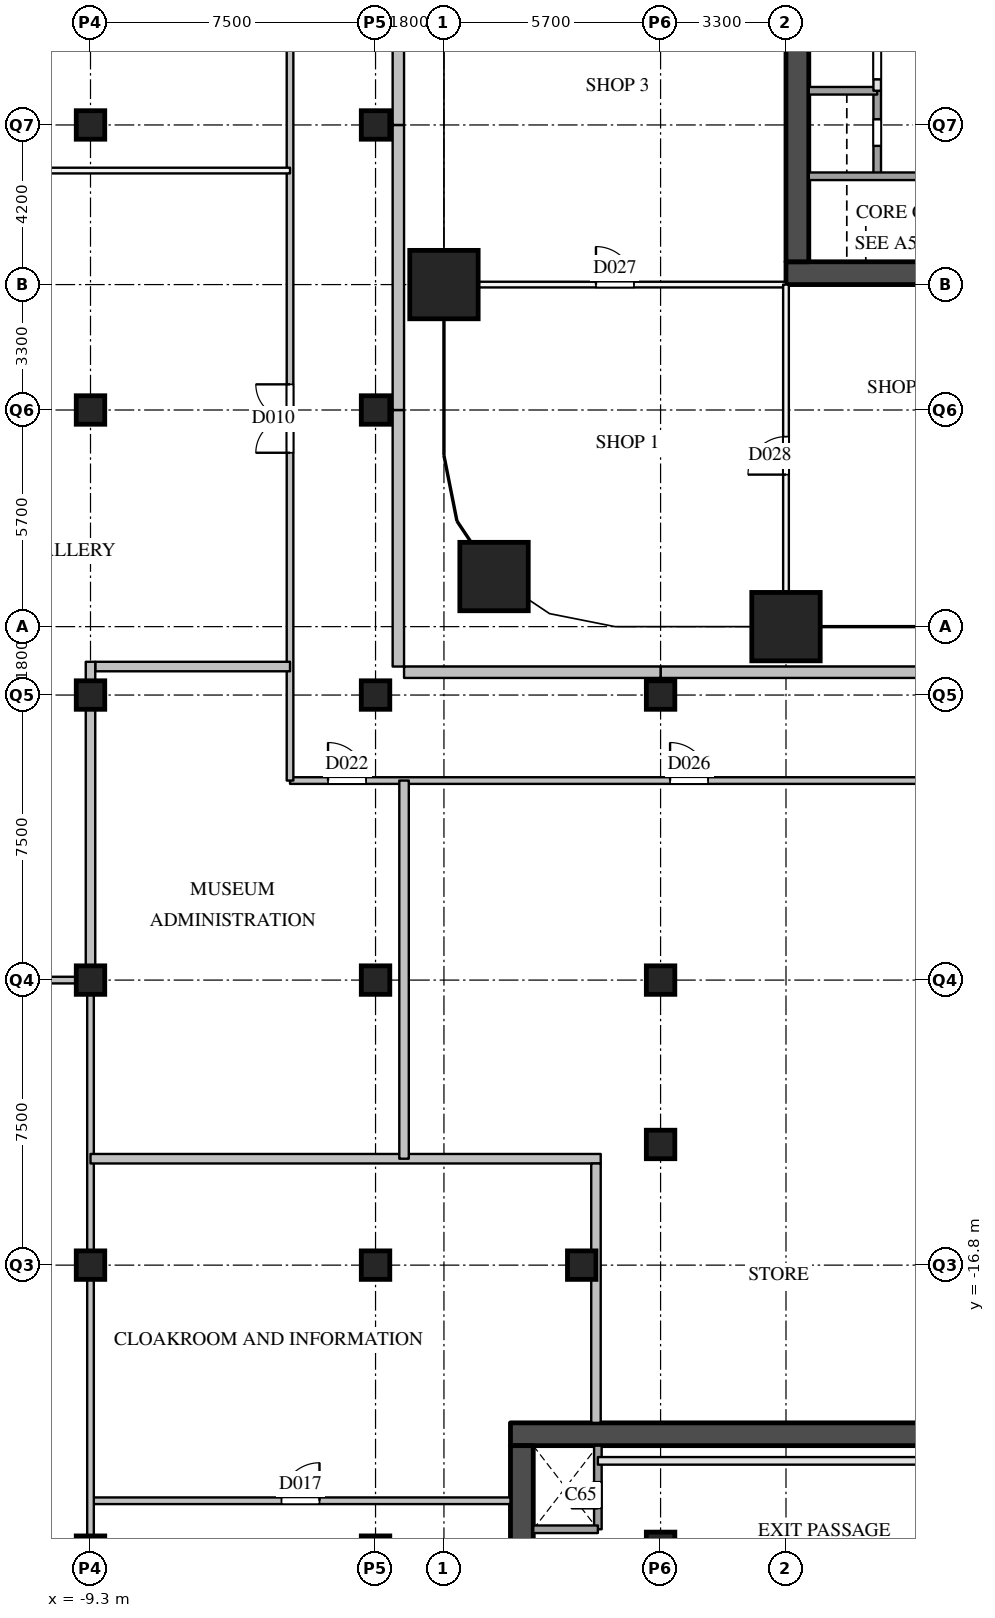
"""IFC4 building model, lengths in metres.
Left out: names, types, materials, properties, quantities, classifications, styles, units other than length and angle.
Written with IfcOpenShell. Run it as: python <this file> out.ifc"""

import sys

from ifc_helpers import new_model, si_unit, direction, frame, frame_2d, origin, origin_2d, place, context, subcontext, project, spatial, rectangle, extrude, element, fill, save


model = new_model("IFC4")
c1 = context("Model", 3, precision=1e-05, world=origin(), true_north=direction((0.0, 1.0)))
c2 = subcontext(c1, "Body", "Model", "MODEL_VIEW")
j1 = project(units=[si_unit("LENGTHUNIT", "METRE"), si_unit("PLANEANGLEUNIT", "RADIAN")], contexts=[c1])
p1 = place(None, origin())
s1 = spatial("IfcSite", under=j1, at=p1, CompositionType="ELEMENT")
p2 = place(p1, origin())
s2 = spatial("IfcBuilding", under=s1, at=p2, CompositionType="ELEMENT")
p3 = place(p2, origin())
s3 = spatial("IfcBuildingStorey", under=s2, at=p3, CompositionType="ELEMENT", Elevation=0.0)
for number, where, z_axis, x_axis in (
    (1, (1.318, 1.318, 0.0), (0.0, 0.0, 1.0), (1.0, 0.0, 0.0)),
    (2, (0.0, 9.0, 0.0), (0.0, 0.0, 1.0), (1.0, 0.0, 0.0)),
    (3, (9.0, 0.0, 0.0), (0.0, 0.0, 1.0), (1.0, 0.0, 0.0)),
):
    element("IfcColumn", number, at=place(p3, frame(where, z_axis=z_axis, x_axis=x_axis)), inside=s3, PredefinedType="COLUMN", context=c2, shape_type="SweptSolid", body=[
        extrude(rectangle(XDim=1.8, YDim=1.8, at=origin_2d()), origin(), (0.0, 0.0, 1.0), 8.0),
    ])
for number, where, z_axis, x_axis in (
    (4, (-9.3, -24.3, 0.0), (0.0, 0.0, 1.0), (1.0, 0.0, 0.0)),
    (5, (-9.3, -16.8, 0.0), (0.0, 0.0, 1.0), (1.0, 0.0, 0.0)),
    (6, (-9.3, -9.3, 0.0), (0.0, 0.0, 1.0), (1.0, 0.0, 0.0)),
    (7, (-9.3, -1.8, 0.0), (0.0, 0.0, 1.0), (1.0, 0.0, 0.0)),
    (8, (-9.3, 5.7, 0.0), (0.0, 0.0, 1.0), (1.0, 0.0, 0.0)),
    (9, (-9.3, 13.2, 0.0), (0.0, 0.0, 1.0), (1.0, 0.0, 0.0)),
    (10, (-1.8, -24.3, 0.0), (0.0, 0.0, 1.0), (1.0, 0.0, 0.0)),
    (11, (-1.8, -16.8, 0.0), (0.0, 0.0, 1.0), (1.0, 0.0, 0.0)),
    (12, (-1.8, -9.3, 0.0), (0.0, 0.0, 1.0), (1.0, 0.0, 0.0)),
    (13, (-1.8, -1.8, 0.0), (0.0, 0.0, 1.0), (1.0, 0.0, 0.0)),
    (14, (-1.8, 5.7, 0.0), (0.0, 0.0, 1.0), (1.0, 0.0, 0.0)),
    (15, (-1.8, 13.2, 0.0), (0.0, 0.0, 1.0), (1.0, 0.0, 0.0)),
    (16, (5.7, -24.2, 0.0), (0.0, 0.0, 1.0), (1.0, 0.0, 0.0)),
    (17, (5.7, -9.3, 0.0), (0.0, 0.0, 1.0), (1.0, 0.0, 0.0)),
    (18, (5.7, -1.8, 0.0), (0.0, 0.0, 1.0), (1.0, 0.0, 0.0)),
    (19, (3.625, -16.8, 0.0), (0.0, 0.0, 1.0), (1.0, 0.0, 0.0)),
    (20, (5.7, -13.625, 0.0), (0.0, 0.0, 1.0), (1.0, 0.0, 0.0)),
):
    element("IfcColumn", number, at=place(p3, frame(where, z_axis=z_axis, x_axis=x_axis)), inside=s3, PredefinedType="COLUMN", context=c2, shape_type="SweptSolid", body=[
        extrude(rectangle(XDim=0.75, YDim=0.75, at=origin_2d()), origin(), (0.0, 0.0, 1.0), 8.0),
    ])
p4 = place(p3, frame((13.2, -1.2, 0.0), z_axis=(0.0, 0.0, 1.0), x_axis=(-1.0, 0.0, 0.0)))
e21 = element("IfcWall", 21, at=p4, inside=s3, PredefinedType="SOLIDWALL", context=c2, shape_type="SweptSolid", body=[
    extrude(rectangle(XDim=7.5, YDim=0.3, at=frame_2d((3.75, 0.0))), origin(), (0.0, 0.0, 1.0), 7.59),
])
for number, where, z_axis, x_axis in (
    (22, (5.7, -1.2, 0.0), (0.0, 0.0, 1.0), (-1.0, 0.0, 0.0)),
    (23, (-1.2, -1.05, 0.0), (0.0, 0.0, 1.0), (0.0, 1.0, 0.0)),
):
    element("IfcWall", number, at=place(p3, frame(where, z_axis=z_axis, x_axis=x_axis)), inside=s3, PredefinedType="SOLIDWALL", context=c2, shape_type="SweptSolid", body=[
        extrude(rectangle(XDim=6.75, YDim=0.3, at=frame_2d((3.375, 0.0))), origin(), (0.0, 0.0, 1.0), 7.59),
    ])
for number, where, z_axis, x_axis in (
    (24, (-1.2, 5.7, 0.0), (0.0, 0.0, 1.0), (0.0, 1.0, 0.0)),
    (25, (-1.2, 13.2, 0.0), (0.0, 0.0, 1.0), (0.0, 1.0, 0.0)),
):
    element("IfcWall", number, at=place(p3, frame(where, z_axis=z_axis, x_axis=x_axis)), inside=s3, PredefinedType="SOLIDWALL", context=c2, shape_type="SweptSolid", body=[
        extrude(rectangle(XDim=7.5, YDim=0.3, at=frame_2d((3.75, 0.0))), origin(), (0.0, 0.0, 1.0), 7.59),
    ])
p5 = place(p3, frame((9.0, 9.3, 0.0), z_axis=(0.0, 0.0, 1.0), x_axis=(1.0, 0.0, 0.0)))
e26 = element("IfcWall", 26, at=p5, inside=s3, PredefinedType="SHEAR", context=c2, shape_type="SweptSolid", body=[
    extrude(rectangle(XDim=9.0, YDim=0.6, at=frame_2d((4.5, 0.0))), origin(), (0.0, 0.0, 1.0), 7.59),
])
p6 = place(p3, frame((9.3, 9.6, 0.0), z_axis=(0.0, 0.0, 1.0), x_axis=(0.0, 1.0, 0.0)))
e27 = element("IfcWall", 27, at=p6, inside=s3, PredefinedType="SHEAR", context=c2, shape_type="SweptSolid", body=[
    extrude(rectangle(XDim=12.3, YDim=0.6, at=frame_2d((6.15, 0.0))), origin(), (0.0, 0.0, 1.0), 7.59),
])
p7 = place(p3, frame((11.4, 14.1, 0.0), z_axis=(0.0, 0.0, 1.0), x_axis=(0.0, 1.0, 0.0)))
e28 = element("IfcWall", 28, at=p7, inside=s3, PredefinedType="PARTITIONING", context=c2, shape_type="SweptSolid", body=[
    extrude(rectangle(XDim=1.6, YDim=0.2, at=frame_2d((0.8, 0.0))), origin(), (0.0, 0.0, 1.0), 7.59),
])
p8 = place(p7, frame((0.3, 0.0, 0.0)))
e29 = element("IfcOpeningElement", 29, at=p8, cuts=e28, PredefinedType="OPENING", context=c2, shape_type="SweptSolid", body=[
    extrude(rectangle(XDim=1.0, YDim=2.1, at=frame_2d((0.5, 1.05))), frame((0.0, 0.11, 0.0), z_axis=(0.0, -1.0, 0.0), x_axis=(1.0, 0.0, 0.0)), (0.0, 0.0, 1.0), 0.22),
])
p9 = place(p3, frame((11.4, 11.9, 0.0), z_axis=(0.0, 0.0, 1.0), x_axis=(0.0, 1.0, 0.0)))
e30 = element("IfcWall", 30, at=p9, inside=s3, PredefinedType="SOLIDWALL", context=c2, shape_type="SweptSolid", body=[
    extrude(rectangle(XDim=2.2, YDim=0.2, at=frame_2d((1.1, 0.0))), origin(), (0.0, 0.0, 1.0), 7.59),
])
p10 = place(p9, frame((0.75, 0.0, 0.0)))
e31 = element("IfcOpeningElement", 31, at=p10, cuts=e30, PredefinedType="OPENING", context=c2, shape_type="SweptSolid", body=[
    extrude(rectangle(XDim=0.7, YDim=2.1, at=frame_2d((0.35, 1.05))), frame((0.0, 0.11, 0.0), z_axis=(0.0, -1.0, 0.0), x_axis=(1.0, 0.0, 0.0)), (0.0, 0.0, 1.0), 0.22),
])
p11 = place(p3, frame((9.6, 11.85, 0.0), z_axis=(0.0, 0.0, 1.0), x_axis=(1.0, 0.0, 0.0)))
e32 = element("IfcWall", 32, at=p11, inside=s3, PredefinedType="SOLIDWALL", context=c2, shape_type="SweptSolid", body=[
    extrude(rectangle(XDim=7.8, YDim=0.2, at=frame_2d((3.9, 0.0))), origin(), (0.0, 0.0, 1.0), 7.59),
])
p12 = place(p11, frame((2.85, 0.0, 0.0)))
e33 = element("IfcOpeningElement", 33, at=p12, cuts=e32, PredefinedType="OPENING", context=c2, shape_type="SweptSolid", body=[
    extrude(rectangle(XDim=0.7, YDim=2.1, at=frame_2d((0.35, 1.05))), frame((0.0, 0.11, 0.0), z_axis=(0.0, -1.0, 0.0), x_axis=(1.0, 0.0, 0.0)), (0.0, 0.0, 1.0), 0.22),
])
p13 = place(p3, frame((9.6, 14.1, 0.0), z_axis=(0.0, 0.0, 1.0), x_axis=(1.0, 0.0, 0.0)))
e34 = element("IfcWall", 34, at=p13, inside=s3, PredefinedType="SOLIDWALL", context=c2, shape_type="SweptSolid", body=[
    extrude(rectangle(XDim=1.8, YDim=0.2, at=frame_2d((0.9, 0.0))), origin(), (0.0, 0.0, 1.0), 7.59),
])
p14 = place(p3, frame((1.75, -21.25, 0.0), z_axis=(0.0, 0.0, 1.0), x_axis=(1.0, 0.0, 0.0)))
e35 = element("IfcWall", 35, at=p14, inside=s3, PredefinedType="SHEAR", context=c2, shape_type="SweptSolid", body=[
    extrude(rectangle(XDim=12.2, YDim=0.6, at=frame_2d((6.1, 0.0))), origin(), (0.0, 0.0, 1.0), 7.59),
])
p15 = place(p3, frame((2.05, -31.95, 0.0), z_axis=(0.0, 0.0, 1.0), x_axis=(0.0, 1.0, 0.0)))
e36 = element("IfcWall", 36, at=p15, inside=s3, PredefinedType="SHEAR", context=c2, shape_type="SweptSolid", body=[
    extrude(rectangle(XDim=10.4, YDim=0.6, at=frame_2d((5.2, 0.0))), origin(), (0.0, 0.0, 1.0), 7.59),
])
p16 = place(p15, frame((3.65, 0.0, 0.0)))
e37 = element("IfcOpeningElement", 37, at=p16, cuts=e36, PredefinedType="OPENING", context=c2, shape_type="SweptSolid", body=[
    extrude(rectangle(XDim=1.8, YDim=2.1, at=frame_2d((0.9, 1.05))), frame((0.0, 0.31, 0.0), z_axis=(0.0, -1.0, 0.0), x_axis=(1.0, 0.0, 0.0)), (0.0, 0.0, 1.0), 0.62),
])
p17 = place(p3, frame((4.05, -23.75, 0.0), z_axis=(0.0, 0.0, 1.0), x_axis=(0.0, 1.0, 0.0)))
e38 = element("IfcWall", 38, at=p17, inside=s3, PredefinedType="SOLIDWALL", context=c2, shape_type="SweptSolid", body=[
    extrude(rectangle(XDim=2.2, YDim=0.2, at=frame_2d((1.1, 0.0))), origin(), (0.0, 0.0, 1.0), 7.59),
])
p18 = place(p17, frame((0.55, 0.0, 0.0)))
e39 = element("IfcOpeningElement", 39, at=p18, cuts=e38, PredefinedType="OPENING", context=c2, shape_type="SweptSolid", body=[
    extrude(rectangle(XDim=0.7, YDim=2.1, at=frame_2d((0.35, 1.05))), frame((0.0, 0.11, 0.0), z_axis=(0.0, -1.0, 0.0), x_axis=(1.0, 0.0, 0.0)), (0.0, 0.0, 1.0), 0.22),
])
p19 = place(p3, frame((2.35, -23.75, 0.0), z_axis=(0.0, 0.0, 1.0), x_axis=(1.0, 0.0, 0.0)))
e40 = element("IfcWall", 40, at=p19, inside=s3, PredefinedType="SOLIDWALL", context=c2, shape_type="SweptSolid", body=[
    extrude(rectangle(XDim=1.7, YDim=0.2, at=frame_2d((0.85, 0.0))), origin(), (0.0, 0.0, 1.0), 7.59),
])
p20 = place(p3, frame((4.05, -21.95, 0.0), z_axis=(0.0, 0.0, 1.0), x_axis=(1.0, 0.0, 0.0)))
e41 = element("IfcWall", 41, at=p20, inside=s3, PredefinedType="PARTITIONING", context=c2, shape_type="SweptSolid", body=[
    extrude(rectangle(XDim=9.3, YDim=0.2, at=frame_2d((4.65, 0.0))), origin(), (0.0, 0.0, 1.0), 7.59),
])
p21 = place(p3, frame((-9.3, -23.0, 0.0), z_axis=(0.0, 0.0, 1.0), x_axis=(1.0, 0.0, 0.0)))
e42 = element("IfcWall", 42, at=p21, inside=s3, PredefinedType="PARTITIONING", context=c2, shape_type="SweptSolid", body=[
    extrude(rectangle(XDim=11.05, YDim=0.175, at=frame_2d((5.525, 0.0))), origin(), (0.0, 0.0, 1.0), 6.79),
])
p22 = place(p21, frame((5.025, 0.0, 0.0)))
e43 = element("IfcOpeningElement", 43, at=p22, cuts=e42, PredefinedType="OPENING", context=c2, shape_type="SweptSolid", body=[
    extrude(rectangle(XDim=1.0, YDim=2.1, at=frame_2d((0.5, 1.05))), frame((0.0, 0.097, 0.0), z_axis=(0.0, -1.0, 0.0), x_axis=(1.0, 0.0, 0.0)), (0.0, 0.0, 1.0), 0.195),
])
p23 = place(p3, frame((-24.3, -9.3, 0.0), z_axis=(0.0, 0.0, 1.0), x_axis=(1.0, 0.0, 0.0)))
e44 = element("IfcWall", 44, at=p23, inside=s3, PredefinedType="PARTITIONING", context=c2, shape_type="SweptSolid", body=[
    extrude(rectangle(XDim=15.0, YDim=0.175, at=frame_2d((7.5, 0.0))), origin(), (0.0, 0.0, 1.0), 6.79),
])
p24 = place(p23, frame((11.1, 0.0, 0.0)))
e45 = element("IfcOpeningElement", 45, at=p24, cuts=e44, PredefinedType="OPENING", context=c2, shape_type="SweptSolid", body=[
    extrude(rectangle(XDim=1.8, YDim=2.1, at=frame_2d((0.9, 1.05))), frame((0.0, 0.097, 0.0), z_axis=(0.0, -1.0, 0.0), x_axis=(1.0, 0.0, 0.0)), (0.0, 0.0, 1.0), 0.195),
])
p25 = place(p3, frame((-4.05, -4.05, 0.0), z_axis=(0.0, 0.0, 1.0), x_axis=(1.0, 0.0, 0.0)))
e46 = element("IfcWall", 46, at=p25, inside=s3, PredefinedType="PARTITIONING", context=c2, shape_type="SweptSolid", body=[
    extrude(rectangle(XDim=18.0, YDim=0.175, at=frame_2d((9.0, 0.0))), origin(), (0.0, 0.0, 1.0), 6.79),
])
p26 = place(p25, frame((1.0, 0.0, 0.0)))
e47 = element("IfcOpeningElement", 47, at=p26, cuts=e46, PredefinedType="OPENING", context=c2, shape_type="SweptSolid", body=[
    extrude(rectangle(XDim=1.0, YDim=2.1, at=frame_2d((0.5, 1.05))), frame((0.0, 0.097, 0.0), z_axis=(0.0, -1.0, 0.0), x_axis=(1.0, 0.0, 0.0)), (0.0, 0.0, 1.0), 0.195),
])
p27 = place(p25, frame((10.0, 0.0, 0.0)))
e48 = element("IfcOpeningElement", 48, at=p27, cuts=e46, PredefinedType="OPENING", context=c2, shape_type="SweptSolid", body=[
    extrude(rectangle(XDim=1.0, YDim=2.1, at=frame_2d((0.5, 1.05))), frame((0.0, 0.097, 0.0), z_axis=(0.0, -1.0, 0.0), x_axis=(1.0, 0.0, 0.0)), (0.0, 0.0, 1.0), 0.195),
])
p28 = place(p3, frame((-9.3, -32.55, 0.0), z_axis=(0.0, 0.0, 1.0), x_axis=(0.0, 1.0, 0.0)))
e49 = element("IfcWall", 49, at=p28, inside=s3, PredefinedType="PARTITIONING", context=c2, shape_type="SweptSolid", body=[
    extrude(rectangle(XDim=23.25, YDim=0.175, at=frame_2d((11.625, 0.0))), origin(), (0.0, 0.0, 1.0), 6.79),
])
p29 = place(p3, frame((-4.05, -4.05, 0.0), z_axis=(0.0, 0.0, 1.0), x_axis=(0.0, 1.0, 0.0)))
e50 = element("IfcWall", 50, at=p29, inside=s3, PredefinedType="PARTITIONING", context=c2, shape_type="SweptSolid", body=[
    extrude(rectangle(XDim=63.0, YDim=0.175, at=frame_2d((31.5, 0.0))), origin(), (0.0, 0.0, 1.0), 6.79),
])
p30 = place(p29, frame((51.535, 0.0, 0.0)))
e51 = element("IfcOpeningElement", 51, at=p30, cuts=e50, PredefinedType="OPENING", context=c2, shape_type="SweptSolid", body=[
    extrude(rectangle(XDim=1.8, YDim=2.1, at=frame_2d((0.9, 1.05))), frame((0.0, 0.097, 0.0), z_axis=(0.0, -1.0, 0.0), x_axis=(1.0, 0.0, 0.0)), (0.0, 0.0, 1.0), 0.195),
])
p31 = place(p29, frame((23.25, 0.0, 0.0)))
e52 = element("IfcOpeningElement", 52, at=p31, cuts=e50, PredefinedType="OPENING", context=c2, shape_type="SweptSolid", body=[
    extrude(rectangle(XDim=1.8, YDim=2.1, at=frame_2d((0.9, 1.05))), frame((0.0, 0.097, 0.0), z_axis=(0.0, -1.0, 0.0), x_axis=(1.0, 0.0, 0.0)), (0.0, 0.0, 1.0), 0.195),
])
p32 = place(p29, frame((38.85, 0.0, 0.0)))
e53 = element("IfcOpeningElement", 53, at=p32, cuts=e50, PredefinedType="OPENING", context=c2, shape_type="SweptSolid", body=[
    extrude(rectangle(XDim=1.8, YDim=2.1, at=frame_2d((0.9, 1.05))), frame((0.0, 0.097, 0.0), z_axis=(0.0, -1.0, 0.0), x_axis=(1.0, 0.0, 0.0)), (0.0, 0.0, 1.0), 0.195),
])
p33 = place(p29, frame((8.625, 0.0, 0.0)))
e54 = element("IfcOpeningElement", 54, at=p33, cuts=e50, PredefinedType="OPENING", context=c2, shape_type="SweptSolid", body=[
    extrude(rectangle(XDim=1.8, YDim=2.1, at=frame_2d((0.9, 1.05))), frame((0.0, 0.097, 0.0), z_axis=(0.0, -1.0, 0.0), x_axis=(1.0, 0.0, 0.0)), (0.0, 0.0, 1.0), 0.195),
])
p34 = place(p3, frame((-15.3, 12.0, 0.0), z_axis=(0.0, 0.0, 1.0), x_axis=(1.0, 0.0, 0.0)))
e55 = element("IfcWall", 55, at=p34, inside=s3, PredefinedType="PARTITIONING", context=c2, shape_type="SweptSolid", body=[
    extrude(rectangle(XDim=11.25, YDim=0.15, at=frame_2d((5.625, 0.0))), origin(), (0.0, 0.0, 1.0), 6.79),
])
p35 = place(p3, frame((0.0, 9.0, 0.0), z_axis=(0.0, 0.0, 1.0), x_axis=(1.0, 0.0, 0.0)))
e56 = element("IfcWall", 56, at=p35, inside=s3, PredefinedType="PARTITIONING", context=c2, shape_type="SweptSolid", body=[
    extrude(rectangle(XDim=9.0, YDim=0.15, at=frame_2d((4.5, 0.0))), origin(), (0.0, 0.0, 1.0), 7.59),
])
p36 = place(p35, frame((4.0, 0.0, 0.0)))
e57 = element("IfcOpeningElement", 57, at=p36, cuts=e56, PredefinedType="OPENING", context=c2, shape_type="SweptSolid", body=[
    extrude(rectangle(XDim=1.0, YDim=2.1, at=frame_2d((0.5, 1.05))), frame((0.0, 0.085, 0.0), z_axis=(0.0, -1.0, 0.0), x_axis=(1.0, 0.0, 0.0)), (0.0, 0.0, 1.0), 0.17),
])
p37 = place(p3, frame((9.0, 0.0, 0.0), z_axis=(0.0, 0.0, 1.0), x_axis=(0.0, 1.0, 0.0)))
e58 = element("IfcWall", 58, at=p37, inside=s3, PredefinedType="PARTITIONING", context=c2, shape_type="SweptSolid", body=[
    extrude(rectangle(XDim=9.0, YDim=0.15, at=frame_2d((4.5, 0.0))), origin(), (0.0, 0.0, 1.0), 7.59),
])
p38 = place(p37, frame((4.0, 0.0, 0.0)))
e59 = element("IfcOpeningElement", 59, at=p38, cuts=e58, PredefinedType="OPENING", context=c2, shape_type="SweptSolid", body=[
    extrude(rectangle(XDim=1.0, YDim=2.1, at=frame_2d((0.5, 1.05))), frame((0.0, 0.085, 0.0), z_axis=(0.0, -1.0, 0.0), x_axis=(1.0, 0.0, 0.0)), (0.0, 0.0, 1.0), 0.17),
])
p39 = place(p3, frame((-9.3, -14.0, 0.0), z_axis=(0.0, 0.0, 1.0), x_axis=(1.0, 0.0, 0.0)))
e60 = element("IfcWall", 60, at=p39, inside=s3, PredefinedType="PARTITIONING", context=c2, shape_type="SweptSolid", body=[
    extrude(rectangle(XDim=13.425, YDim=0.25, at=frame_2d((6.712, 0.0))), origin(), (0.0, 0.0, 1.0), 6.79),
])
p40 = place(p3, frame((-9.175, -1.05, 0.0), z_axis=(0.0, 0.0, 1.0), x_axis=(1.0, 0.0, 0.0)))
e61 = element("IfcWall", 61, at=p40, inside=s3, PredefinedType="PARTITIONING", context=c2, shape_type="SweptSolid", body=[
    extrude(rectangle(XDim=5.125, YDim=0.25, at=frame_2d((2.562, 0.0))), origin(), (0.0, 0.0, 1.0), 6.79),
])
p41 = place(p3, frame((-9.3, -9.3, 0.0), z_axis=(0.0, 0.0, 1.0), x_axis=(0.0, 1.0, 0.0)))
e62 = element("IfcWall", 62, at=p41, inside=s3, PredefinedType="PARTITIONING", context=c2, shape_type="SweptSolid", body=[
    extrude(rectangle(XDim=8.375, YDim=0.25, at=frame_2d((4.188, 0.0))), origin(), (0.0, 0.0, 1.0), 6.79),
])
p42 = place(p3, frame((-1.05, -14.0, 0.0), z_axis=(0.0, 0.0, 1.0), x_axis=(0.0, 1.0, 0.0)))
e63 = element("IfcWall", 63, at=p42, inside=s3, PredefinedType="PARTITIONING", context=c2, shape_type="SweptSolid", body=[
    extrude(rectangle(XDim=9.95, YDim=0.25, at=frame_2d((4.975, 0.0))), origin(), (0.0, 0.0, 1.0), 6.79),
])
p43 = place(p3, frame((4.0, -20.95, 0.0), z_axis=(0.0, 0.0, 1.0), x_axis=(0.0, 1.0, 0.0)))
e64 = element("IfcWall", 64, at=p43, inside=s3, PredefinedType="PARTITIONING", context=c2, shape_type="SweptSolid", body=[
    extrude(rectangle(XDim=6.825, YDim=0.25, at=frame_2d((3.413, 0.0))), origin(), (0.0, 0.0, 1.0), 7.59),
])
p44 = place(p10, origin())
e65 = element("IfcDoor", 65, at=p44, inside=s3, OperationType="SINGLE_SWING_RIGHT", PredefinedType="DOOR", context=c2, shape_type="SweptSolid", body=[
    extrude(rectangle(XDim=0.7, YDim=2.1, at=frame_2d((0.35, 1.05))), frame((0.0, 0.025, 0.0), z_axis=(0.0, -1.0, 0.0), x_axis=(1.0, 0.0, 0.0)), (0.0, 0.0, 1.0), 0.05),
])
fill(e31, e65)
p45 = place(p8, origin())
e66 = element("IfcDoor", 66, at=p45, inside=s3, OperationType="SINGLE_SWING_RIGHT", PredefinedType="DOOR", context=c2, shape_type="SweptSolid", body=[
    extrude(rectangle(XDim=1.0, YDim=2.1, at=frame_2d((0.5, 1.05))), frame((0.0, 0.025, 0.0), z_axis=(0.0, -1.0, 0.0), x_axis=(1.0, 0.0, 0.0)), (0.0, 0.0, 1.0), 0.05),
])
fill(e29, e66)
p46 = place(p18, origin())
e67 = element("IfcDoor", 67, at=p46, inside=s3, OperationType="SINGLE_SWING_LEFT", PredefinedType="DOOR", context=c2, shape_type="SweptSolid", body=[
    extrude(rectangle(XDim=0.7, YDim=2.1, at=frame_2d((0.35, 1.05))), frame((0.0, 0.025, 0.0), z_axis=(0.0, -1.0, 0.0), x_axis=(1.0, 0.0, 0.0)), (0.0, 0.0, 1.0), 0.05),
])
fill(e39, e67)
p47 = place(p33, origin())
e68 = element("IfcDoor", 68, at=p47, inside=s3, OperationType="DOUBLE_DOOR_SINGLE_SWING", PredefinedType="DOOR", context=c2, shape_type="SweptSolid", body=[
    extrude(rectangle(XDim=1.8, YDim=2.1, at=frame_2d((0.9, 1.05))), frame((0.0, 0.025, 0.0), z_axis=(0.0, -1.0, 0.0), x_axis=(1.0, 0.0, 0.0)), (0.0, 0.0, 1.0), 0.05),
])
fill(e54, e68)
p48 = place(p22, origin())
e69 = element("IfcDoor", 69, at=p48, inside=s3, OperationType="SINGLE_SWING_RIGHT", PredefinedType="DOOR", context=c2, shape_type="SweptSolid", body=[
    extrude(rectangle(XDim=1.0, YDim=2.1, at=frame_2d((0.5, 1.05))), frame((0.0, 0.025, 0.0), z_axis=(0.0, -1.0, 0.0), x_axis=(1.0, 0.0, 0.0)), (0.0, 0.0, 1.0), 0.05),
])
fill(e43, e69)
p49 = place(p26, origin())
e70 = element("IfcDoor", 70, at=p49, inside=s3, OperationType="SINGLE_SWING_LEFT", PredefinedType="DOOR", context=c2, shape_type="SweptSolid", body=[
    extrude(rectangle(XDim=1.0, YDim=2.1, at=frame_2d((0.5, 1.05))), frame((0.0, 0.025, 0.0), z_axis=(0.0, -1.0, 0.0), x_axis=(1.0, 0.0, 0.0)), (0.0, 0.0, 1.0), 0.05),
])
fill(e47, e70)
p50 = place(p27, origin())
e71 = element("IfcDoor", 71, at=p50, inside=s3, OperationType="SINGLE_SWING_LEFT", PredefinedType="DOOR", context=c2, shape_type="SweptSolid", body=[
    extrude(rectangle(XDim=1.0, YDim=2.1, at=frame_2d((0.5, 1.05))), frame((0.0, 0.025, 0.0), z_axis=(0.0, -1.0, 0.0), x_axis=(1.0, 0.0, 0.0)), (0.0, 0.0, 1.0), 0.05),
])
fill(e48, e71)
p51 = place(p36, origin())
e72 = element("IfcDoor", 72, at=p51, inside=s3, OperationType="SINGLE_SWING_LEFT", PredefinedType="DOOR", context=c2, shape_type="SweptSolid", body=[
    extrude(rectangle(XDim=1.0, YDim=2.1, at=frame_2d((0.5, 1.05))), frame((0.0, 0.025, 0.0), z_axis=(0.0, -1.0, 0.0), x_axis=(1.0, 0.0, 0.0)), (0.0, 0.0, 1.0), 0.05),
])
fill(e57, e72)
p52 = place(p38, origin())
e73 = element("IfcDoor", 73, at=p52, inside=s3, OperationType="SINGLE_SWING_LEFT", PredefinedType="DOOR", context=c2, shape_type="SweptSolid", body=[
    extrude(rectangle(XDim=1.0, YDim=2.1, at=frame_2d((0.5, 1.05))), frame((0.0, 0.025, 0.0), z_axis=(0.0, -1.0, 0.0), x_axis=(1.0, 0.0, 0.0)), (0.0, 0.0, 1.0), 0.05),
])
fill(e59, e73)
save(model, sys.argv[1])
